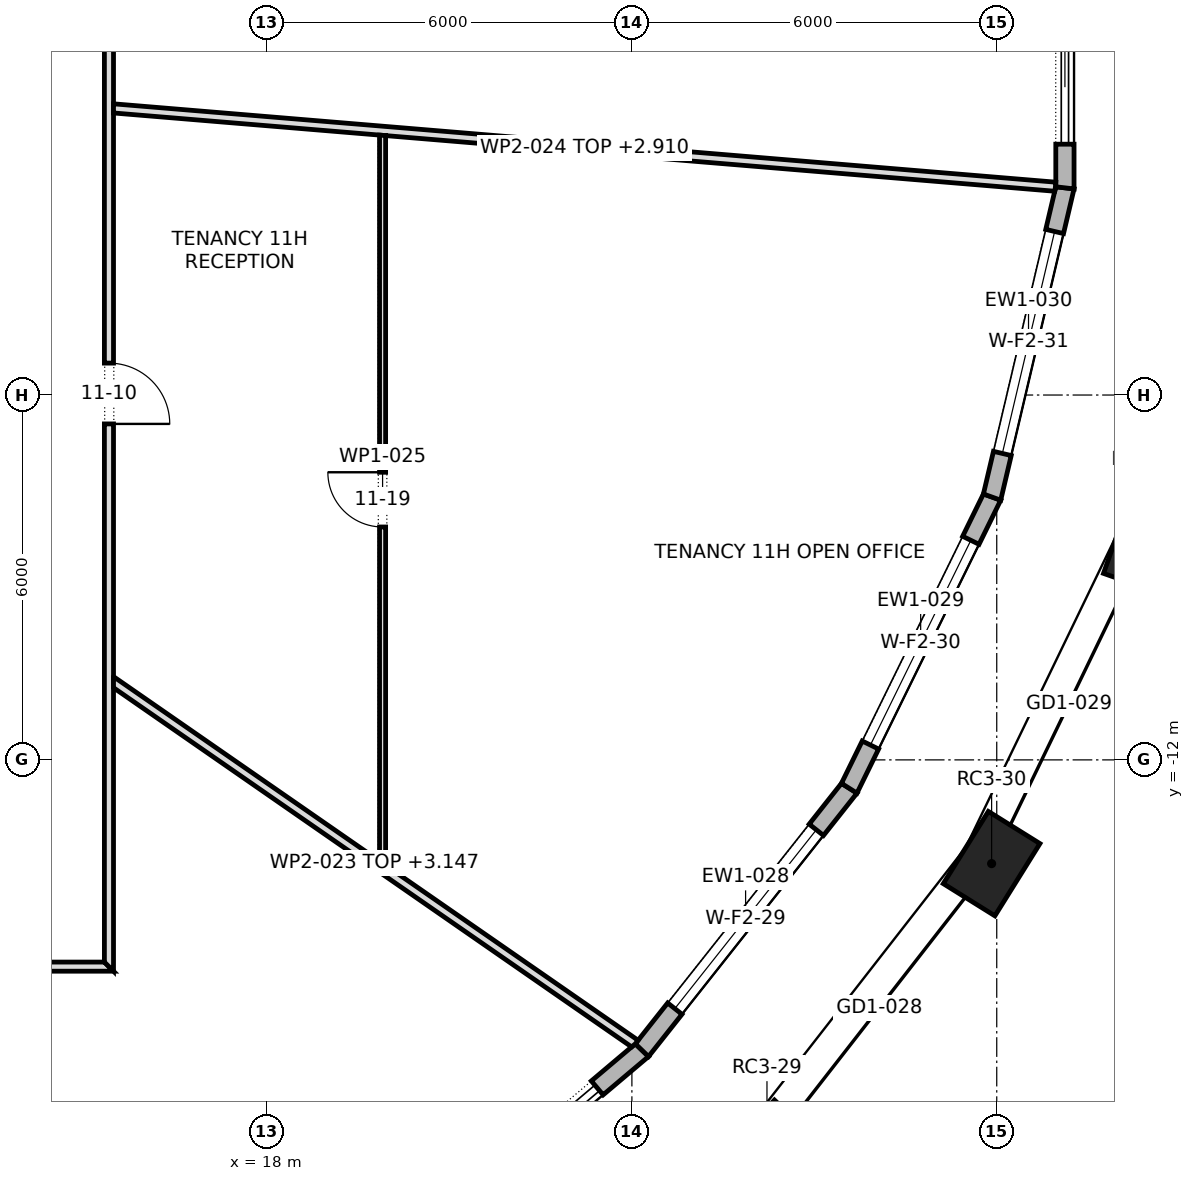
"""IFC4 building model, lengths in metres.
Left out: names, types, materials, properties, quantities, classifications, styles, units other than length and angle.
Written with IfcOpenShell. Run it as: python <this file> out.ifc"""

import sys

from ifc_helpers import new_model, si_unit, direction, frame, frame_2d, origin, origin_2d, place, context, subcontext, project, spatial, polyline, rectangle, outline, extrude, element, fill, save


model = new_model("IFC4")
c1 = context("Model", 3, precision=1e-05, world=origin(), true_north=direction((0.0, 1.0)))
c2 = subcontext(c1, "Body", "Model", "MODEL_VIEW")
j1 = project(units=[si_unit("LENGTHUNIT", "METRE"), si_unit("PLANEANGLEUNIT", "RADIAN")], contexts=[c1])
p1 = place(None, origin())
s1 = spatial("IfcSite", under=j1, at=p1, CompositionType="ELEMENT")
p2 = place(p1, origin())
s2 = spatial("IfcBuilding", under=s1, at=p2, CompositionType="ELEMENT")
p3 = place(p2, frame((0.0, 0.0, 154.9)))
s3 = spatial("IfcBuildingStorey", under=s2, at=p3, CompositionType="ELEMENT", Elevation=154.9)
for number, where, z_axis, x_axis in (
    (1, (26.221, -18.445, 0.0), (0.0, 0.0, 1.0), (0.692, 0.722, 0.0)),
    (2, (29.916, -13.706, 0.0), (0.0, 0.0, 1.0), (0.529, 0.849, 0.0)),
    (3, (32.46, -8.44, 0.0), (0.0, 0.0, 1.0), (0.334, 0.943, 0.0)),
):
    element("IfcColumn", number, at=place(p3, frame(where, z_axis=z_axis, x_axis=x_axis)), inside=s3, PredefinedType="COLUMN", context=c2, shape_type="SweptSolid", body=[
        extrude(rectangle(XDim=1.4, YDim=1.0, at=origin_2d()), origin(), (0.0, 0.0, 1.0), 4.2),
    ])
p4 = place(p3, frame((19.829, -20.435, 0.0), z_axis=(0.0, 0.0, 1.0), x_axis=(0.764076096085, 0.645126126732, 0.0)))
e4 = element("IfcWall", 4, at=p4, inside=s3, PredefinedType="STANDARD", context=c2, shape_type="SweptSolid", body=[
    extrude(outline(polyline([(-0.014, -0.15), (5.69, -0.15), (5.66, 0.15), (0.014, 0.15), (-0.014, -0.15)])), origin(), (0.0, 0.0, 1.0), 3.9),
])
p5 = place(p4, frame((0.962, 0.0, 0.0)))
e5 = element("IfcOpeningElement", 5, at=p5, cuts=e4, PredefinedType="OPENING", context=c2, shape_type="SweptSolid", body=[
    extrude(rectangle(XDim=3.75, YDim=3.45, at=frame_2d((1.875, 1.725))), frame((0.0, 0.162, 0.0), z_axis=(0.0, -1.0, 0.0), x_axis=(1.0, 0.0, 0.0)), (0.0, 0.0, 1.0), 0.324),
])
p6 = place(p3, frame((24.165, -16.774, 0.0), z_axis=(0.0, 0.0, 1.0), x_axis=(0.620577705153, 0.784144955902, 0.0)))
e6 = element("IfcWall", 6, at=p6, inside=s3, PredefinedType="STANDARD", context=c2, shape_type="SweptSolid", body=[
    extrude(outline(polyline([(-0.015, -0.15), (5.509, -0.15), (5.477, 0.15), (0.015, 0.15), (-0.015, -0.15)])), origin(), (0.0, 0.0, 1.0), 3.9),
])
p7 = place(p6, frame((0.871, 0.0, 0.6)))
e7 = element("IfcOpeningElement", 7, at=p7, cuts=e6, PredefinedType="OPENING", context=c2, shape_type="SweptSolid", body=[
    extrude(rectangle(XDim=3.75, YDim=2.85, at=frame_2d((1.875, 1.425))), frame((0.0, 0.162, 0.0), z_axis=(0.0, -1.0, 0.0), x_axis=(1.0, 0.0, 0.0)), (0.0, 0.0, 1.0), 0.324),
])
p8 = place(p3, frame((27.574, -12.467, 0.0), z_axis=(0.0, 0.0, 1.0), x_axis=(0.440444485575, 0.897779847806, 0.0)))
e8 = element("IfcWall", 8, at=p8, inside=s3, PredefinedType="STANDARD", context=c2, shape_type="SweptSolid", body=[
    extrude(outline(polyline([(-0.016, -0.15), (5.35, -0.15), (5.317, 0.15), (0.016, 0.15), (-0.016, -0.15)])), origin(), (0.0, 0.0, 1.0), 3.9),
])
p9 = place(p8, frame((0.792, 0.0, 0.6)))
e9 = element("IfcOpeningElement", 9, at=p9, cuts=e8, PredefinedType="OPENING", context=c2, shape_type="SweptSolid", body=[
    extrude(rectangle(XDim=3.75, YDim=2.85, at=frame_2d((1.875, 1.425))), frame((0.0, 0.162, 0.0), z_axis=(0.0, -1.0, 0.0), x_axis=(1.0, 0.0, 0.0)), (0.0, 0.0, 1.0), 0.324),
])
p10 = place(p3, frame((29.923, -7.678, 0.0), z_axis=(0.0, 0.0, 1.0), x_axis=(0.229297175564, 0.973356463624, 0.0)))
e10 = element("IfcWall", 10, at=p10, inside=s3, PredefinedType="STANDARD", context=c2, shape_type="SweptSolid", body=[
    extrude(outline(polyline([(-0.017, -0.15), (5.242, -0.15), (5.207, 0.15), (0.017, 0.15), (-0.017, -0.15)])), origin(), (0.0, 0.0, 1.0), 3.9),
])
p11 = place(p10, frame((0.737, 0.0, 0.6)))
e11 = element("IfcOpeningElement", 11, at=p11, cuts=e10, PredefinedType="OPENING", context=c2, shape_type="SweptSolid", body=[
    extrude(rectangle(XDim=3.75, YDim=2.85, at=frame_2d((1.875, 1.425))), frame((0.0, 0.162, 0.0), z_axis=(0.0, -1.0, 0.0), x_axis=(1.0, 0.0, 0.0)), (0.0, 0.0, 1.0), 0.324),
])
p12 = place(p3, frame((31.121, -2.593, 0.0), z_axis=(0.0, 0.0, 1.0), x_axis=(0.0, 1.0, 0.0)))
e12 = element("IfcWall", 12, at=p12, inside=s3, PredefinedType="STANDARD", context=c2, shape_type="SweptSolid", body=[
    extrude(outline(polyline([(-0.017, -0.15), (5.203, -0.15), (5.168, 0.15), (0.017, 0.15), (-0.017, -0.15)])), origin(), (0.0, 0.0, 1.0), 3.9),
])
p13 = place(p12, frame((0.718, 0.0, 0.0)))
e13 = element("IfcOpeningElement", 13, at=p13, cuts=e12, PredefinedType="OPENING", context=c2, shape_type="SweptSolid", body=[
    extrude(rectangle(XDim=3.75, YDim=3.45, at=frame_2d((1.875, 1.725))), frame((0.0, 0.162, 0.0), z_axis=(0.0, -1.0, 0.0), x_axis=(1.0, 0.0, 0.0)), (0.0, 0.0, 1.0), 0.324),
])
p14 = place(p3, frame((-15.475, -15.4, 0.0), z_axis=(0.0, 0.0, 1.0), x_axis=(1.0, 0.0, 0.0)))
e14 = element("IfcWall", 14, at=p14, inside=s3, PredefinedType="PARTITIONING", context=c2, shape_type="SweptSolid", body=[
    extrude(outline(polyline([(0.0, -0.075), (1.935, -0.075), (3.869, -0.075), (5.803, -0.075), (7.738, -0.075), (9.672, -0.075), (11.606, -0.075), (13.541, -0.075), (15.475, -0.075), (17.409, -0.075), (19.344, -0.075), (21.278, -0.075), (23.212, -0.075), (25.147, -0.075), (27.081, -0.075), (29.016, -0.075), (30.95, -0.075), (30.8, 0.075), (28.885, 0.075), (26.969, 0.075), (25.053, 0.075), (23.138, 0.075), (21.222, 0.075), (19.306, 0.075), (17.391, 0.075), (15.475, 0.075), (13.56, 0.075), (11.644, 0.075), (9.728, 0.075), (7.812, 0.075), (5.897, 0.075), (3.981, 0.075), (2.066, 0.075), (0.15, 0.075), (0.0, -0.075)])), origin(), (0.0, 0.0, 1.0), 3.9),
])
p15 = place(p14, frame((11.785, 0.0, 0.0)))
e15 = element("IfcOpeningElement", 15, at=p15, cuts=e14, PredefinedType="OPENING", context=c2, shape_type="SweptSolid", body=[
    extrude(rectangle(XDim=1.0, YDim=2.1, at=frame_2d((0.5, 1.05))), frame((0.0, 0.087, 0.0), z_axis=(0.0, -1.0, 0.0), x_axis=(1.0, 0.0, 0.0)), (0.0, 0.0, 1.0), 0.174),
])
p16 = place(p14, frame((17.315, 0.0, 0.0)))
e16 = element("IfcOpeningElement", 16, at=p16, cuts=e14, PredefinedType="OPENING", context=c2, shape_type="SweptSolid", body=[
    extrude(rectangle(XDim=1.0, YDim=2.1, at=frame_2d((0.5, 1.05))), frame((0.0, 0.087, 0.0), z_axis=(0.0, -1.0, 0.0), x_axis=(1.0, 0.0, 0.0)), (0.0, 0.0, 1.0), 0.174),
])
p17 = place(p14, frame((25.44, 0.0, 0.0)))
e17 = element("IfcOpeningElement", 17, at=p17, cuts=e14, PredefinedType="OPENING", context=c2, shape_type="SweptSolid", body=[
    extrude(rectangle(XDim=1.0, YDim=2.1, at=frame_2d((0.5, 1.05))), frame((0.0, 0.087, 0.0), z_axis=(0.0, -1.0, 0.0), x_axis=(1.0, 0.0, 0.0)), (0.0, 0.0, 1.0), 0.174),
])
p18 = place(p3, frame((15.4, -15.475, 0.0), z_axis=(0.0, 0.0, 1.0), x_axis=(0.0, 1.0, 0.0)))
e18 = element("IfcWall", 18, at=p18, inside=s3, PredefinedType="PARTITIONING", context=c2, shape_type="SweptSolid", body=[
    extrude(outline(polyline([(0.0, -0.075), (1.935, -0.075), (3.869, -0.075), (5.803, -0.075), (7.738, -0.075), (9.672, -0.075), (11.606, -0.075), (13.541, -0.075), (15.475, -0.075), (17.409, -0.075), (19.344, -0.075), (21.278, -0.075), (23.212, -0.075), (25.147, -0.075), (27.081, -0.075), (29.016, -0.075), (30.95, -0.075), (30.8, 0.075), (28.885, 0.075), (26.969, 0.075), (25.053, 0.075), (23.138, 0.075), (21.222, 0.075), (19.306, 0.075), (17.391, 0.075), (15.475, 0.075), (13.56, 0.075), (11.644, 0.075), (9.728, 0.075), (7.812, 0.075), (5.897, 0.075), (3.981, 0.075), (2.066, 0.075), (0.15, 0.075), (0.0, -0.075)])), origin(), (0.0, 0.0, 1.0), 3.9),
])
p19 = place(p18, frame((9.0, 0.0, 0.0)))
e19 = element("IfcOpeningElement", 19, at=p19, cuts=e18, PredefinedType="OPENING", context=c2, shape_type="SweptSolid", body=[
    extrude(rectangle(XDim=1.0, YDim=2.1, at=frame_2d((0.5, 1.05))), frame((0.0, 0.087, 0.0), z_axis=(0.0, -1.0, 0.0), x_axis=(1.0, 0.0, 0.0)), (0.0, 0.0, 1.0), 0.174),
])
p20 = place(p18, frame((21.635, 0.0, 0.0)))
e20 = element("IfcOpeningElement", 20, at=p20, cuts=e18, PredefinedType="OPENING", context=c2, shape_type="SweptSolid", body=[
    extrude(rectangle(XDim=1.8, YDim=2.1, at=frame_2d((0.9, 1.05))), frame((0.0, 0.087, 0.0), z_axis=(0.0, -1.0, 0.0), x_axis=(1.0, 0.0, 0.0)), (0.0, 0.0, 1.0), 0.174),
])
p21 = place(p3, frame((15.433, -10.692, 0.0), z_axis=(0.0, 0.0, 1.0), x_axis=(0.821818585553, -0.569749254006, 0.0)))
e21 = element("IfcWall", 21, at=p21, inside=s3, PredefinedType="PARTITIONING", context=c2, shape_type="SweptSolid", body=[
    extrude(outline(polyline([(0.104, -0.075), (1.832, -0.075), (3.56, -0.075), (5.288, -0.075), (7.016, -0.075), (8.744, -0.075), (10.472, -0.075), (10.493, 0.002), (10.497, 0.072), (10.497, 0.075), (8.773, 0.075), (7.049, 0.075), (5.325, 0.075), (5.324, 0.074), (5.323, 0.075), (3.549, 0.075), (1.774, 0.075), (0.0, 0.075), (0.0, 0.074), (0.104, -0.075)])), origin(), (0.0, 0.0, 1.0), 3.147),
])
p22 = place(p3, frame((15.469, -1.286, 0.0), z_axis=(0.0, 0.0, 1.0), x_axis=(0.996560145348, -0.082872653534, 0.0)))
e22 = element("IfcWall", 22, at=p22, inside=s3, PredefinedType="PARTITIONING", context=c2, shape_type="SweptSolid", body=[
    extrude(outline(polyline([(0.012, -0.075), (1.504, -0.075), (2.996, -0.075), (4.488, -0.075), (4.502, -0.074), (4.502, -0.075), (6.343, -0.075), (8.183, -0.075), (10.023, -0.075), (11.864, -0.075), (13.704, -0.075), (15.544, -0.075), (15.549, -0.045), (15.549, 0.075), (13.605, 0.075), (11.662, 0.075), (9.718, 0.075), (7.774, 0.075), (5.831, 0.075), (3.887, 0.075), (1.944, 0.075), (0.0, 0.075), (0.0, 0.07), (0.012, -0.075)])), origin(), (0.0, 0.0, 1.0), 2.91),
])
p23 = place(p3, frame((19.9, -1.726, 0.0), z_axis=(0.0, 0.0, 1.0), x_axis=(0.0, -1.0, 0.0)))
e23 = element("IfcWall", 23, at=p23, inside=s3, PredefinedType="PARTITIONING", context=c2, shape_type="SweptSolid", body=[
    extrude(outline(polyline([(0.0, -0.05), (1.99, -0.05), (3.979, -0.05), (5.969, -0.05), (7.959, -0.05), (9.948, -0.05), (11.938, -0.05), (12.007, 0.049), (12.007, 0.05), (10.007, 0.05), (8.007, 0.05), (6.007, 0.05), (4.008, 0.05), (2.008, 0.05), (0.008, 0.05), (0.0, -0.047), (0.0, -0.05)])), origin(), (0.0, 0.0, 1.0), 3.9),
])
p24 = place(p23, frame((5.544, 0.0, 0.0)))
e24 = element("IfcOpeningElement", 24, at=p24, cuts=e23, PredefinedType="OPENING", context=c2, shape_type="SweptSolid", body=[
    extrude(rectangle(XDim=0.9, YDim=2.1, at=frame_2d((0.45, 1.05))), frame((0.0, 0.062, 0.0), z_axis=(0.0, -1.0, 0.0), x_axis=(1.0, 0.0, 0.0)), (0.0, 0.0, 1.0), 0.124),
])
p25 = place(p5, origin())
e25 = element("IfcDoor", 25, at=p25, inside=s3, OperationType="DOUBLE_DOOR_SLIDING", PredefinedType="DOOR", context=c2, shape_type="SweptSolid", body=[
    extrude(rectangle(XDim=3.75, YDim=3.45, at=frame_2d((1.875, 1.725))), frame((0.0, 0.025, 0.0), z_axis=(0.0, -1.0, 0.0), x_axis=(1.0, 0.0, 0.0)), (0.0, 0.0, 1.0), 0.05),
])
fill(e5, e25)
p26 = place(p7, origin())
e26 = element("IfcWindow", 26, at=p26, inside=s3, PartitioningType="TRIPLE_PANEL_VERTICAL", PredefinedType="WINDOW", context=c2, shape_type="SweptSolid", body=[
    extrude(rectangle(XDim=3.75, YDim=2.85, at=frame_2d((1.875, 1.425))), frame((0.0, 0.03, 0.0), z_axis=(0.0, -1.0, 0.0), x_axis=(1.0, 0.0, 0.0)), (0.0, 0.0, 1.0), 0.06),
])
fill(e7, e26)
p27 = place(p9, origin())
e27 = element("IfcWindow", 27, at=p27, inside=s3, PartitioningType="TRIPLE_PANEL_VERTICAL", PredefinedType="WINDOW", context=c2, shape_type="SweptSolid", body=[
    extrude(rectangle(XDim=3.75, YDim=2.85, at=frame_2d((1.875, 1.425))), frame((0.0, 0.03, 0.0), z_axis=(0.0, -1.0, 0.0), x_axis=(1.0, 0.0, 0.0)), (0.0, 0.0, 1.0), 0.06),
])
fill(e9, e27)
p28 = place(p11, origin())
e28 = element("IfcWindow", 28, at=p28, inside=s3, PartitioningType="TRIPLE_PANEL_VERTICAL", PredefinedType="WINDOW", context=c2, shape_type="SweptSolid", body=[
    extrude(rectangle(XDim=3.75, YDim=2.85, at=frame_2d((1.875, 1.425))), frame((0.0, 0.03, 0.0), z_axis=(0.0, -1.0, 0.0), x_axis=(1.0, 0.0, 0.0)), (0.0, 0.0, 1.0), 0.06),
])
fill(e11, e28)
p29 = place(p13, origin())
e29 = element("IfcDoor", 29, at=p29, inside=s3, OperationType="DOUBLE_DOOR_SLIDING", PredefinedType="DOOR", context=c2, shape_type="SweptSolid", body=[
    extrude(rectangle(XDim=3.75, YDim=3.45, at=frame_2d((1.875, 1.725))), frame((0.0, 0.025, 0.0), z_axis=(0.0, -1.0, 0.0), x_axis=(1.0, 0.0, 0.0)), (0.0, 0.0, 1.0), 0.05),
])
fill(e13, e29)
p30 = place(p19, frame((1.0, 0.0, 0.0), z_axis=(0.0, 0.0, 1.0), x_axis=(-1.0, 0.0, 0.0)))
e30 = element("IfcDoor", 30, at=p30, inside=s3, OperationType="SINGLE_SWING_LEFT", PredefinedType="DOOR", context=c2, shape_type="SweptSolid", body=[
    extrude(rectangle(XDim=1.0, YDim=2.1, at=frame_2d((0.5, 1.05))), frame((0.0, 0.025, 0.0), z_axis=(0.0, -1.0, 0.0), x_axis=(1.0, 0.0, 0.0)), (0.0, 0.0, 1.0), 0.05),
])
fill(e19, e30)
p31 = place(p24, frame((0.9, 0.0, 0.0), z_axis=(0.0, 0.0, 1.0), x_axis=(-1.0, 0.0, 0.0)))
e31 = element("IfcDoor", 31, at=p31, inside=s3, OperationType="SINGLE_SWING_LEFT", PredefinedType="DOOR", context=c2, shape_type="SweptSolid", body=[
    extrude(rectangle(XDim=0.9, YDim=2.1, at=frame_2d((0.45, 1.05))), frame((0.0, 0.025, 0.0), z_axis=(0.0, -1.0, 0.0), x_axis=(1.0, 0.0, 0.0)), (0.0, 0.0, 1.0), 0.05),
])
fill(e24, e31)
save(model, sys.argv[1])
